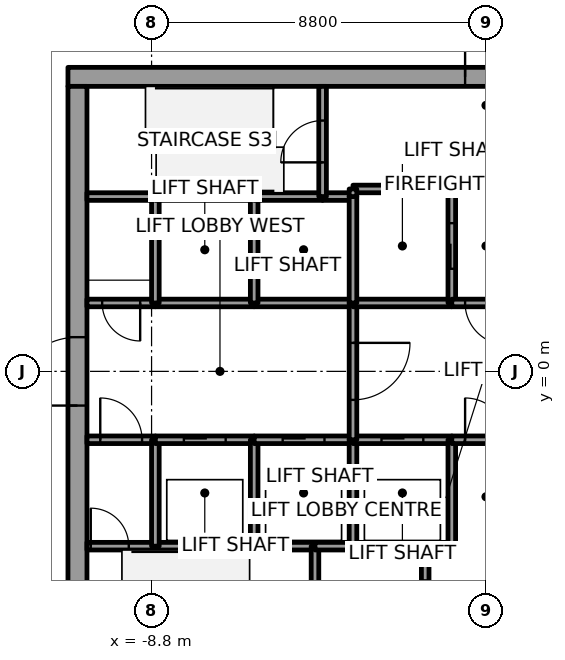
"""IFC4 building model, lengths in metres.
Left out: names, types, materials, properties, quantities, classifications, styles, units other than length and angle.
Written with IfcOpenShell. Run it as: python <this file> out.ifc"""

import sys

from ifc_helpers import new_model, si_unit, direction, frame, frame_2d, origin, place, context, subcontext, project, spatial, rectangle, extrude, element, fill, save


model = new_model("IFC4")
c1 = context("Model", 3, precision=1e-05, world=origin(), true_north=direction((0.0, 1.0)))
c2 = subcontext(c1, "Body", "Model", "MODEL_VIEW")
j1 = project(units=[si_unit("LENGTHUNIT", "METRE"), si_unit("PLANEANGLEUNIT", "RADIAN")], contexts=[c1])
p1 = place(None, origin())
s1 = spatial("IfcSite", under=j1, at=p1, CompositionType="ELEMENT")
p2 = place(p1, origin())
s2 = spatial("IfcBuilding", under=s1, at=p2, CompositionType="ELEMENT")
p3 = place(p2, frame((0.0, 0.0, 137.8)))
s3 = spatial("IfcBuildingStorey", under=s2, at=p3, CompositionType="ELEMENT", Elevation=137.8)
p4 = place(p3, frame((-11.0, 7.75, 0.0), z_axis=(0.0, 0.0, 1.0), x_axis=(1.0, 0.0, 0.0)))
e1 = element("IfcWall", 1, at=p4, inside=s3, PredefinedType="SHEAR", context=c2, shape_type="SweptSolid", body=[
    extrude(rectangle(XDim=22.0, YDim=0.5, at=frame_2d((11.0, 0.0))), origin(), (0.0, 0.0, 1.0), 4.0),
])
p5 = place(p4, frame((10.45, 0.0, 0.0)))
e2 = element("IfcOpeningElement", 2, at=p5, cuts=e1, PredefinedType="OPENING", context=c2, shape_type="SweptSolid", body=[
    extrude(rectangle(XDim=1.1, YDim=2.1, at=frame_2d((0.55, 1.05))), frame((0.0, 0.25, 0.0), z_axis=(0.0, -1.0, 0.0), x_axis=(1.0, 0.0, 0.0)), (0.0, 0.0, 1.0), 0.5),
])
p6 = place(p3, frame((-10.75, -7.5, 0.0), z_axis=(0.0, 0.0, 1.0), x_axis=(0.0, 1.0, 0.0)))
e3 = element("IfcWall", 3, at=p6, inside=s3, PredefinedType="SHEAR", context=c2, shape_type="SweptSolid", body=[
    extrude(rectangle(XDim=15.0, YDim=0.5, at=frame_2d((7.5, 0.0))), origin(), (0.0, 0.0, 1.0), 4.0),
])
p7 = place(p6, frame((6.6, 0.0, 0.0)))
e4 = element("IfcOpeningElement", 4, at=p7, cuts=e3, PredefinedType="OPENING", context=c2, shape_type="SweptSolid", body=[
    extrude(rectangle(XDim=1.8, YDim=2.1, at=frame_2d((0.9, 1.05))), frame((0.0, 0.25, 0.0), z_axis=(0.0, -1.0, 0.0), x_axis=(1.0, 0.0, 0.0)), (0.0, 0.0, 1.0), 0.5),
])
p8 = place(p3, frame((-10.5, -4.6, 0.0), z_axis=(0.0, 0.0, 1.0), x_axis=(1.0, 0.0, 0.0)))
e5 = element("IfcWall", 5, at=p8, inside=s3, PredefinedType="SOLIDWALL", context=c2, shape_type="SweptSolid", body=[
    extrude(rectangle(XDim=1.8, YDim=0.2, at=frame_2d((0.9, 0.0))), origin(), (0.0, 0.0, 1.0), 3.85),
])
p9 = place(p8, frame((0.1, 0.0, 0.0)))
e6 = element("IfcOpeningElement", 6, at=p9, cuts=e5, PredefinedType="OPENING", context=c2, shape_type="SweptSolid", body=[
    extrude(rectangle(XDim=1.0, YDim=2.1, at=frame_2d((0.5, 1.05))), frame((0.0, 0.1, 0.0), z_axis=(0.0, -1.0, 0.0), x_axis=(1.0, 0.0, 0.0)), (0.0, 0.0, 1.0), 0.2),
])
p10 = place(p3, frame((-10.5, -1.8, 0.0), z_axis=(0.0, 0.0, 1.0), x_axis=(1.0, 0.0, 0.0)))
e7 = element("IfcWall", 7, at=p10, inside=s3, PredefinedType="SOLIDWALL", context=c2, shape_type="SweptSolid", body=[
    extrude(rectangle(XDim=1.8, YDim=0.2, at=frame_2d((0.9, 0.0))), origin(), (0.0, 0.0, 1.0), 3.85),
])
p11 = place(p10, frame((0.35, 0.0, 0.0)))
e8 = element("IfcOpeningElement", 8, at=p11, cuts=e7, PredefinedType="OPENING", context=c2, shape_type="SweptSolid", body=[
    extrude(rectangle(XDim=1.1, YDim=2.1, at=frame_2d((0.55, 1.05))), frame((0.0, 0.1, 0.0), z_axis=(0.0, -1.0, 0.0), x_axis=(1.0, 0.0, 0.0)), (0.0, 0.0, 1.0), 0.2),
])
p12 = place(p3, frame((-8.7, 1.8, 0.0), z_axis=(0.0, 0.0, 1.0), x_axis=(-1.0, 0.0, 0.0)))
e9 = element("IfcWall", 9, at=p12, inside=s3, PredefinedType="SOLIDWALL", context=c2, shape_type="SweptSolid", body=[
    extrude(rectangle(XDim=1.8, YDim=0.2, at=frame_2d((0.9, 0.0))), origin(), (0.0, 0.0, 1.0), 3.85),
])
p13 = place(p12, frame((0.4, 0.0, 0.0)))
e10 = element("IfcOpeningElement", 10, at=p13, cuts=e9, PredefinedType="OPENING", context=c2, shape_type="SweptSolid", body=[
    extrude(rectangle(XDim=1.0, YDim=2.1, at=frame_2d((0.5, 1.05))), frame((0.0, 0.1, 0.0), z_axis=(0.0, -1.0, 0.0), x_axis=(1.0, 0.0, 0.0)), (0.0, 0.0, 1.0), 0.2),
])
p14 = place(p3, frame((-8.7, 4.6, 0.0), z_axis=(0.0, 0.0, 1.0), x_axis=(-1.0, 0.0, 0.0)))
e11 = element("IfcWall", 11, at=p14, inside=s3, PredefinedType="SOLIDWALL", context=c2, shape_type="SweptSolid", body=[
    extrude(rectangle(XDim=1.8, YDim=0.2, at=frame_2d((0.9, 0.0))), origin(), (0.0, 0.0, 1.0), 3.85),
])
p15 = place(p3, frame((-8.7, -4.6, 0.0), z_axis=(0.0, 0.0, 1.0), x_axis=(1.0, 0.0, 0.0)))
e12 = element("IfcWall", 12, at=p15, inside=s3, PredefinedType="SOLIDWALL", context=c2, shape_type="SweptSolid", body=[
    extrude(rectangle(XDim=2.6, YDim=0.2, at=frame_2d((1.3, 0.0))), origin(), (0.0, 0.0, 1.0), 3.85),
])
p16 = place(p3, frame((-8.7, -4.6, 0.0), z_axis=(0.0, 0.0, 1.0), x_axis=(0.0, 1.0, 0.0)))
e13 = element("IfcWall", 13, at=p16, inside=s3, PredefinedType="SOLIDWALL", context=c2, shape_type="SweptSolid", body=[
    extrude(rectangle(XDim=2.8, YDim=0.2, at=frame_2d((1.4, 0.0))), origin(), (0.0, 0.0, 1.0), 3.85),
])
p17 = place(p3, frame((-8.7, -1.8, 0.0), z_axis=(0.0, 0.0, 1.0), x_axis=(1.0, 0.0, 0.0)))
e14 = element("IfcWall", 14, at=p17, inside=s3, PredefinedType="SOLIDWALL", context=c2, shape_type="SweptSolid", body=[
    extrude(rectangle(XDim=2.6, YDim=0.2, at=frame_2d((1.3, 0.0))), origin(), (0.0, 0.0, 1.0), 3.85),
])
p18 = place(p17, frame((0.75, 0.0, 0.0)))
e15 = element("IfcOpeningElement", 15, at=p18, cuts=e14, PredefinedType="OPENING", context=c2, shape_type="SweptSolid", body=[
    extrude(rectangle(XDim=1.1, YDim=2.1, at=frame_2d((0.55, 1.05))), frame((0.0, 0.1, 0.0), z_axis=(0.0, -1.0, 0.0), x_axis=(1.0, 0.0, 0.0)), (0.0, 0.0, 1.0), 0.2),
])
p19 = place(p3, frame((-6.1, 1.8, 0.0), z_axis=(0.0, 0.0, 1.0), x_axis=(-1.0, 0.0, 0.0)))
e16 = element("IfcWall", 16, at=p19, inside=s3, PredefinedType="SOLIDWALL", context=c2, shape_type="SweptSolid", body=[
    extrude(rectangle(XDim=2.6, YDim=0.2, at=frame_2d((1.3, 0.0))), origin(), (0.0, 0.0, 1.0), 3.85),
])
p20 = place(p3, frame((-8.7, 1.8, 0.0), z_axis=(0.0, 0.0, 1.0), x_axis=(0.0, 1.0, 0.0)))
e17 = element("IfcWall", 17, at=p20, inside=s3, PredefinedType="SOLIDWALL", context=c2, shape_type="SweptSolid", body=[
    extrude(rectangle(XDim=2.8, YDim=0.2, at=frame_2d((1.4, 0.0))), origin(), (0.0, 0.0, 1.0), 3.85),
])
p21 = place(p3, frame((-6.1, 4.6, 0.0), z_axis=(0.0, 0.0, 1.0), x_axis=(-1.0, 0.0, 0.0)))
e18 = element("IfcWall", 18, at=p21, inside=s3, PredefinedType="SOLIDWALL", context=c2, shape_type="SweptSolid", body=[
    extrude(rectangle(XDim=2.6, YDim=0.2, at=frame_2d((1.3, 0.0))), origin(), (0.0, 0.0, 1.0), 3.85),
])
p22 = place(p3, frame((-6.1, -4.6, 0.0), z_axis=(0.0, 0.0, 1.0), x_axis=(1.0, 0.0, 0.0)))
e19 = element("IfcWall", 19, at=p22, inside=s3, PredefinedType="SOLIDWALL", context=c2, shape_type="SweptSolid", body=[
    extrude(rectangle(XDim=1.6, YDim=0.2, at=frame_2d((0.8, 0.0))), origin(), (0.0, 0.0, 1.0), 3.85),
])
p23 = place(p3, frame((-6.1, -4.6, 0.0), z_axis=(0.0, 0.0, 1.0), x_axis=(0.0, 1.0, 0.0)))
e20 = element("IfcWall", 20, at=p23, inside=s3, PredefinedType="SOLIDWALL", context=c2, shape_type="SweptSolid", body=[
    extrude(rectangle(XDim=2.8, YDim=0.2, at=frame_2d((1.4, 0.0))), origin(), (0.0, 0.0, 1.0), 3.85),
])
p24 = place(p3, frame((-6.1, -1.8, 0.0), z_axis=(0.0, 0.0, 1.0), x_axis=(1.0, 0.0, 0.0)))
e21 = element("IfcWall", 21, at=p24, inside=s3, PredefinedType="SOLIDWALL", context=c2, shape_type="SweptSolid", body=[
    extrude(rectangle(XDim=2.6, YDim=0.2, at=frame_2d((1.3, 0.0))), origin(), (0.0, 0.0, 1.0), 3.85),
])
p25 = place(p24, frame((0.75, 0.0, 0.0)))
e22 = element("IfcOpeningElement", 22, at=p25, cuts=e21, PredefinedType="OPENING", context=c2, shape_type="SweptSolid", body=[
    extrude(rectangle(XDim=1.1, YDim=2.1, at=frame_2d((0.55, 1.05))), frame((0.0, 0.1, 0.0), z_axis=(0.0, -1.0, 0.0), x_axis=(1.0, 0.0, 0.0)), (0.0, 0.0, 1.0), 0.2),
])
p26 = place(p3, frame((-3.5, 1.8, 0.0), z_axis=(0.0, 0.0, 1.0), x_axis=(-1.0, 0.0, 0.0)))
e23 = element("IfcWall", 23, at=p26, inside=s3, PredefinedType="SOLIDWALL", context=c2, shape_type="SweptSolid", body=[
    extrude(rectangle(XDim=2.6, YDim=0.2, at=frame_2d((1.3, 0.0))), origin(), (0.0, 0.0, 1.0), 3.85),
])
p27 = place(p3, frame((-6.1, 1.8, 0.0), z_axis=(0.0, 0.0, 1.0), x_axis=(0.0, 1.0, 0.0)))
e24 = element("IfcWall", 24, at=p27, inside=s3, PredefinedType="SOLIDWALL", context=c2, shape_type="SweptSolid", body=[
    extrude(rectangle(XDim=2.8, YDim=0.2, at=frame_2d((1.4, 0.0))), origin(), (0.0, 0.0, 1.0), 3.85),
])
p28 = place(p3, frame((-4.3, 4.6, 0.0), z_axis=(0.0, 0.0, 1.0), x_axis=(-1.0, 0.0, 0.0)))
e25 = element("IfcWall", 25, at=p28, inside=s3, PredefinedType="SOLIDWALL", context=c2, shape_type="SweptSolid", body=[
    extrude(rectangle(XDim=1.8, YDim=0.2, at=frame_2d((0.9, 0.0))), origin(), (0.0, 0.0, 1.0), 3.85),
])
p29 = place(p3, frame((-4.5, -4.6, 0.0), z_axis=(0.0, 0.0, 1.0), x_axis=(0.0, -1.0, 0.0)))
e26 = element("IfcWall", 26, at=p29, inside=s3, PredefinedType="SOLIDWALL", context=c2, shape_type="SweptSolid", body=[
    extrude(rectangle(XDim=2.9, YDim=0.2, at=frame_2d((1.45, 0.0))), origin(), (0.0, 0.0, 1.0), 3.85),
])
p30 = place(p3, frame((-4.5, -4.6, 0.0), z_axis=(0.0, 0.0, 1.0), x_axis=(1.0, 0.0, 0.0)))
e27 = element("IfcWall", 27, at=p30, inside=s3, PredefinedType="SOLIDWALL", context=c2, shape_type="SweptSolid", body=[
    extrude(rectangle(XDim=1.0, YDim=0.2, at=frame_2d((0.5, 0.0))), origin(), (0.0, 0.0, 1.0), 3.85),
])
p31 = place(p3, frame((-3.5, 4.6, 0.0), z_axis=(0.0, 0.0, 1.0), x_axis=(-1.0, 0.0, 0.0)))
e28 = element("IfcWall", 28, at=p31, inside=s3, PredefinedType="SOLIDWALL", context=c2, shape_type="SweptSolid", body=[
    extrude(rectangle(XDim=0.8, YDim=0.2, at=frame_2d((0.4, 0.0))), origin(), (0.0, 0.0, 1.0), 3.85),
])
p32 = place(p3, frame((-4.3, 4.6, 0.0), z_axis=(0.0, 0.0, 1.0), x_axis=(0.0, 1.0, 0.0)))
e29 = element("IfcWall", 29, at=p32, inside=s3, PredefinedType="SOLIDWALL", context=c2, shape_type="SweptSolid", body=[
    extrude(rectangle(XDim=2.9, YDim=0.2, at=frame_2d((1.45, 0.0))), origin(), (0.0, 0.0, 1.0), 3.85),
])
p33 = place(p32, frame((0.9, 0.0, 0.0)))
e30 = element("IfcOpeningElement", 30, at=p33, cuts=e29, PredefinedType="OPENING", context=c2, shape_type="SweptSolid", body=[
    extrude(rectangle(XDim=1.1, YDim=2.1, at=frame_2d((0.55, 1.05))), frame((0.0, 0.1, 0.0), z_axis=(0.0, -1.0, 0.0), x_axis=(1.0, 0.0, 0.0)), (0.0, 0.0, 1.0), 0.2),
])
p34 = place(p3, frame((-3.5, -4.6, 0.0), z_axis=(0.0, 0.0, 1.0), x_axis=(1.0, 0.0, 0.0)))
e31 = element("IfcWall", 31, at=p34, inside=s3, PredefinedType="SOLIDWALL", context=c2, shape_type="SweptSolid", body=[
    extrude(rectangle(XDim=1.9, YDim=0.2, at=frame_2d((0.95, 0.0))), origin(), (0.0, 0.0, 1.0), 3.85),
])
p35 = place(p3, frame((-3.5, -4.6, 0.0), z_axis=(0.0, 0.0, 1.0), x_axis=(0.0, 1.0, 0.0)))
e32 = element("IfcWall", 32, at=p35, inside=s3, PredefinedType="SOLIDWALL", context=c2, shape_type="SweptSolid", body=[
    extrude(rectangle(XDim=2.8, YDim=0.2, at=frame_2d((1.4, 0.0))), origin(), (0.0, 0.0, 1.0), 3.85),
])
p36 = place(p3, frame((-3.5, -1.8, 0.0), z_axis=(0.0, 0.0, 1.0), x_axis=(1.0, 0.0, 0.0)))
e33 = element("IfcWall", 33, at=p36, inside=s3, PredefinedType="SOLIDWALL", context=c2, shape_type="SweptSolid", body=[
    extrude(rectangle(XDim=2.6, YDim=0.2, at=frame_2d((1.3, 0.0))), origin(), (0.0, 0.0, 1.0), 3.85),
])
p37 = place(p36, frame((0.75, 0.0, 0.0)))
e34 = element("IfcOpeningElement", 34, at=p37, cuts=e33, PredefinedType="OPENING", context=c2, shape_type="SweptSolid", body=[
    extrude(rectangle(XDim=1.1, YDim=2.1, at=frame_2d((0.55, 1.05))), frame((0.0, 0.1, 0.0), z_axis=(0.0, -1.0, 0.0), x_axis=(1.0, 0.0, 0.0)), (0.0, 0.0, 1.0), 0.2),
])
p38 = place(p3, frame((-3.5, 1.8, 0.0), z_axis=(0.0, 0.0, 1.0), x_axis=(0.0, -1.0, 0.0)))
e35 = element("IfcWall", 35, at=p38, inside=s3, PredefinedType="SOLIDWALL", context=c2, shape_type="SweptSolid", body=[
    extrude(rectangle(XDim=3.6, YDim=0.2, at=frame_2d((1.8, 0.0))), origin(), (0.0, 0.0, 1.0), 3.85),
])
p39 = place(p38, frame((1.05, 0.0, 0.0)))
e36 = element("IfcOpeningElement", 36, at=p39, cuts=e35, PredefinedType="OPENING", context=c2, shape_type="SweptSolid", body=[
    extrude(rectangle(XDim=1.5, YDim=2.1, at=frame_2d((0.75, 1.05))), frame((0.0, 0.1, 0.0), z_axis=(0.0, -1.0, 0.0), x_axis=(1.0, 0.0, 0.0)), (0.0, 0.0, 1.0), 0.2),
])
p40 = place(p3, frame((-0.9, 1.8, 0.0), z_axis=(0.0, 0.0, 1.0), x_axis=(-1.0, 0.0, 0.0)))
e37 = element("IfcWall", 37, at=p40, inside=s3, PredefinedType="SOLIDWALL", context=c2, shape_type="SweptSolid", body=[
    extrude(rectangle(XDim=2.6, YDim=0.2, at=frame_2d((1.3, 0.0))), origin(), (0.0, 0.0, 1.0), 3.85),
])
p41 = place(p3, frame((-3.5, 4.6, 0.0), z_axis=(0.0, 0.0, 1.0), x_axis=(0.0, -1.0, 0.0)))
e38 = element("IfcWall", 38, at=p41, inside=s3, PredefinedType="SOLIDWALL", context=c2, shape_type="SweptSolid", body=[
    extrude(rectangle(XDim=2.8, YDim=0.2, at=frame_2d((1.4, 0.0))), origin(), (0.0, 0.0, 1.0), 3.85),
])
p42 = place(p3, frame((-0.9, 1.8, 0.0), z_axis=(0.0, 0.0, 1.0), x_axis=(0.0, 1.0, 0.0)))
e39 = element("IfcWall", 39, at=p42, inside=s3, PredefinedType="SOLIDWALL", context=c2, shape_type="SweptSolid", body=[
    extrude(rectangle(XDim=3.0, YDim=0.2, at=frame_2d((1.5, 0.0))), origin(), (0.0, 0.0, 1.0), 3.85),
])
p43 = place(p42, frame((0.9, 0.0, 0.0)))
e40 = element("IfcOpeningElement", 40, at=p43, cuts=e39, PredefinedType="OPENING", context=c2, shape_type="SweptSolid", body=[
    extrude(rectangle(XDim=1.2, YDim=2.1, at=frame_2d((0.6, 1.05))), frame((0.0, 0.1, 0.0), z_axis=(0.0, -1.0, 0.0), x_axis=(1.0, 0.0, 0.0)), (0.0, 0.0, 1.0), 0.2),
])
p44 = place(p3, frame((-0.9, 4.8, 0.0), z_axis=(0.0, 0.0, 1.0), x_axis=(-1.0, 0.0, 0.0)))
e41 = element("IfcWall", 41, at=p44, inside=s3, PredefinedType="SOLIDWALL", context=c2, shape_type="SweptSolid", body=[
    extrude(rectangle(XDim=2.6, YDim=0.2, at=frame_2d((1.3, 0.0))), origin(), (0.0, 0.0, 1.0), 3.85),
])
p45 = place(p3, frame((-3.5, 4.8, 0.0), z_axis=(0.0, 0.0, 1.0), x_axis=(0.0, -1.0, 0.0)))
e42 = element("IfcWall", 42, at=p45, inside=s3, PredefinedType="SOLIDWALL", context=c2, shape_type="SweptSolid", body=[
    extrude(rectangle(XDim=0.2, YDim=0.2, at=frame_2d((0.1, 0.0))), origin(), (0.0, 0.0, 1.0), 3.85),
])
p46 = place(p3, frame((-1.6, -7.5, 0.0), z_axis=(0.0, 0.0, 1.0), x_axis=(0.0, 1.0, 0.0)))
e43 = element("IfcWall", 43, at=p46, inside=s3, PredefinedType="SOLIDWALL", context=c2, shape_type="SweptSolid", body=[
    extrude(rectangle(XDim=2.9, YDim=0.2, at=frame_2d((1.45, 0.0))), origin(), (0.0, 0.0, 1.0), 3.85),
])
p47 = place(p46, frame((0.9, 0.0, 0.0)))
e44 = element("IfcOpeningElement", 44, at=p47, cuts=e43, PredefinedType="OPENING", context=c2, shape_type="SweptSolid", body=[
    extrude(rectangle(XDim=1.1, YDim=2.1, at=frame_2d((0.55, 1.05))), frame((0.0, 0.1, 0.0), z_axis=(0.0, -1.0, 0.0), x_axis=(1.0, 0.0, 0.0)), (0.0, 0.0, 1.0), 0.2),
])
p48 = place(p3, frame((-1.6, -4.6, 0.0), z_axis=(0.0, 0.0, 1.0), x_axis=(1.0, 0.0, 0.0)))
e45 = element("IfcWall", 45, at=p48, inside=s3, PredefinedType="SOLIDWALL", context=c2, shape_type="SweptSolid", body=[
    extrude(rectangle(XDim=0.7, YDim=0.2, at=frame_2d((0.35, 0.0))), origin(), (0.0, 0.0, 1.0), 3.85),
])
p49 = place(p3, frame((-0.9, -4.6, 0.0), z_axis=(0.0, 0.0, 1.0), x_axis=(0.0, 1.0, 0.0)))
e46 = element("IfcWall", 46, at=p49, inside=s3, PredefinedType="SOLIDWALL", context=c2, shape_type="SweptSolid", body=[
    extrude(rectangle(XDim=2.8, YDim=0.2, at=frame_2d((1.4, 0.0))), origin(), (0.0, 0.0, 1.0), 3.85),
])
p50 = place(p3, frame((-0.9, -1.8, 0.0), z_axis=(0.0, 0.0, 1.0), x_axis=(1.0, 0.0, 0.0)))
e47 = element("IfcWall", 47, at=p50, inside=s3, PredefinedType="SOLIDWALL", context=c2, shape_type="SweptSolid", body=[
    extrude(rectangle(XDim=1.8, YDim=0.2, at=frame_2d((0.9, 0.0))), origin(), (0.0, 0.0, 1.0), 3.85),
])
p51 = place(p50, frame((0.35, 0.0, 0.0)))
e48 = element("IfcOpeningElement", 48, at=p51, cuts=e47, PredefinedType="OPENING", context=c2, shape_type="SweptSolid", body=[
    extrude(rectangle(XDim=1.1, YDim=2.1, at=frame_2d((0.55, 1.05))), frame((0.0, 0.1, 0.0), z_axis=(0.0, -1.0, 0.0), x_axis=(1.0, 0.0, 0.0)), (0.0, 0.0, 1.0), 0.2),
])
p52 = place(p3, frame((0.9, 1.8, 0.0), z_axis=(0.0, 0.0, 1.0), x_axis=(-1.0, 0.0, 0.0)))
e49 = element("IfcWall", 49, at=p52, inside=s3, PredefinedType="SOLIDWALL", context=c2, shape_type="SweptSolid", body=[
    extrude(rectangle(XDim=1.8, YDim=0.2, at=frame_2d((0.9, 0.0))), origin(), (0.0, 0.0, 1.0), 3.85),
])
p53 = place(p52, frame((0.35, 0.0, 0.0)))
e50 = element("IfcOpeningElement", 50, at=p53, cuts=e49, PredefinedType="OPENING", context=c2, shape_type="SweptSolid", body=[
    extrude(rectangle(XDim=1.1, YDim=2.1, at=frame_2d((0.55, 1.05))), frame((0.0, 0.1, 0.0), z_axis=(0.0, -1.0, 0.0), x_axis=(1.0, 0.0, 0.0)), (0.0, 0.0, 1.0), 0.2),
])
p54 = place(p18, origin())
e51 = element("IfcDoor", 51, at=p54, inside=s3, OperationType="SLIDING_TO_LEFT", PredefinedType="DOOR", context=c2, shape_type="SweptSolid", body=[
    extrude(rectangle(XDim=1.1, YDim=2.1, at=frame_2d((0.55, 1.05))), frame((0.0, 0.025, 0.0), z_axis=(0.0, -1.0, 0.0), x_axis=(1.0, 0.0, 0.0)), (0.0, 0.0, 1.0), 0.05),
])
fill(e15, e51)
p55 = place(p25, origin())
e52 = element("IfcDoor", 52, at=p55, inside=s3, OperationType="SLIDING_TO_LEFT", PredefinedType="DOOR", context=c2, shape_type="SweptSolid", body=[
    extrude(rectangle(XDim=1.1, YDim=2.1, at=frame_2d((0.55, 1.05))), frame((0.0, 0.025, 0.0), z_axis=(0.0, -1.0, 0.0), x_axis=(1.0, 0.0, 0.0)), (0.0, 0.0, 1.0), 0.05),
])
fill(e22, e52)
p56 = place(p37, origin())
e53 = element("IfcDoor", 53, at=p56, inside=s3, OperationType="SLIDING_TO_RIGHT", PredefinedType="DOOR", context=c2, shape_type="SweptSolid", body=[
    extrude(rectangle(XDim=1.1, YDim=2.1, at=frame_2d((0.55, 1.05))), frame((0.0, 0.025, 0.0), z_axis=(0.0, -1.0, 0.0), x_axis=(1.0, 0.0, 0.0)), (0.0, 0.0, 1.0), 0.05),
])
fill(e34, e53)
p57 = place(p43, origin())
e54 = element("IfcDoor", 54, at=p57, inside=s3, OperationType="SLIDING_TO_RIGHT", PredefinedType="DOOR", context=c2, shape_type="SweptSolid", body=[
    extrude(rectangle(XDim=1.2, YDim=2.1, at=frame_2d((0.6, 1.05))), frame((0.0, 0.025, 0.0), z_axis=(0.0, -1.0, 0.0), x_axis=(1.0, 0.0, 0.0)), (0.0, 0.0, 1.0), 0.05),
])
fill(e40, e54)
p58 = place(p39, origin())
e55 = element("IfcDoor", 55, at=p58, inside=s3, OperationType="DOUBLE_DOOR_SINGLE_SWING", PredefinedType="DOOR", context=c2, shape_type="SweptSolid", body=[
    extrude(rectangle(XDim=1.5, YDim=2.1, at=frame_2d((0.75, 1.05))), frame((0.0, 0.025, 0.0), z_axis=(0.0, -1.0, 0.0), x_axis=(1.0, 0.0, 0.0)), (0.0, 0.0, 1.0), 0.05),
])
fill(e36, e55)
p59 = place(p11, origin())
e56 = element("IfcDoor", 56, at=p59, inside=s3, OperationType="SINGLE_SWING_RIGHT", PredefinedType="DOOR", context=c2, shape_type="SweptSolid", body=[
    extrude(rectangle(XDim=1.1, YDim=2.1, at=frame_2d((0.55, 1.05))), frame((0.0, 0.025, 0.0), z_axis=(0.0, -1.0, 0.0), x_axis=(1.0, 0.0, 0.0)), (0.0, 0.0, 1.0), 0.05),
])
fill(e8, e56)
p60 = place(p53, origin())
e57 = element("IfcDoor", 57, at=p60, inside=s3, OperationType="SINGLE_SWING_LEFT", PredefinedType="DOOR", context=c2, shape_type="SweptSolid", body=[
    extrude(rectangle(XDim=1.1, YDim=2.1, at=frame_2d((0.55, 1.05))), frame((0.0, 0.025, 0.0), z_axis=(0.0, -1.0, 0.0), x_axis=(1.0, 0.0, 0.0)), (0.0, 0.0, 1.0), 0.05),
])
fill(e50, e57)
p61 = place(p51, origin())
e58 = element("IfcDoor", 58, at=p61, inside=s3, OperationType="SINGLE_SWING_LEFT", PredefinedType="DOOR", context=c2, shape_type="SweptSolid", body=[
    extrude(rectangle(XDim=1.1, YDim=2.1, at=frame_2d((0.55, 1.05))), frame((0.0, 0.025, 0.0), z_axis=(0.0, -1.0, 0.0), x_axis=(1.0, 0.0, 0.0)), (0.0, 0.0, 1.0), 0.05),
])
fill(e48, e58)
p62 = place(p13, origin())
e59 = element("IfcDoor", 59, at=p62, inside=s3, OperationType="SINGLE_SWING_LEFT", PredefinedType="DOOR", context=c2, shape_type="SweptSolid", body=[
    extrude(rectangle(XDim=1.0, YDim=2.1, at=frame_2d((0.5, 1.05))), frame((0.0, 0.025, 0.0), z_axis=(0.0, -1.0, 0.0), x_axis=(1.0, 0.0, 0.0)), (0.0, 0.0, 1.0), 0.05),
])
fill(e10, e59)
p63 = place(p9, origin())
e60 = element("IfcDoor", 60, at=p63, inside=s3, OperationType="SINGLE_SWING_LEFT", PredefinedType="DOOR", context=c2, shape_type="SweptSolid", body=[
    extrude(rectangle(XDim=1.0, YDim=2.1, at=frame_2d((0.5, 1.05))), frame((0.0, 0.025, 0.0), z_axis=(0.0, -1.0, 0.0), x_axis=(1.0, 0.0, 0.0)), (0.0, 0.0, 1.0), 0.05),
])
fill(e6, e60)
p64 = place(p33, origin())
e61 = element("IfcDoor", 61, at=p64, inside=s3, OperationType="SINGLE_SWING_LEFT", PredefinedType="DOOR", context=c2, shape_type="SweptSolid", body=[
    extrude(rectangle(XDim=1.1, YDim=2.1, at=frame_2d((0.55, 1.05))), frame((0.0, 0.025, 0.0), z_axis=(0.0, -1.0, 0.0), x_axis=(1.0, 0.0, 0.0)), (0.0, 0.0, 1.0), 0.05),
])
fill(e30, e61)
p65 = place(p7, origin())
e62 = element("IfcDoor", 62, at=p65, inside=s3, OperationType="DOUBLE_DOOR_SINGLE_SWING", PredefinedType="DOOR", context=c2, shape_type="SweptSolid", body=[
    extrude(rectangle(XDim=1.8, YDim=2.1, at=frame_2d((0.9, 1.05))), frame((0.0, 0.025, 0.0), z_axis=(0.0, -1.0, 0.0), x_axis=(1.0, 0.0, 0.0)), (0.0, 0.0, 1.0), 0.05),
])
fill(e4, e62)
p66 = place(p5, origin())
e63 = element("IfcDoor", 63, at=p66, inside=s3, OperationType="SINGLE_SWING_RIGHT", PredefinedType="DOOR", context=c2, shape_type="SweptSolid", body=[
    extrude(rectangle(XDim=1.1, YDim=2.1, at=frame_2d((0.55, 1.05))), frame((0.0, 0.025, 0.0), z_axis=(0.0, -1.0, 0.0), x_axis=(1.0, 0.0, 0.0)), (0.0, 0.0, 1.0), 0.05),
])
fill(e2, e63)
save(model, sys.argv[1])
